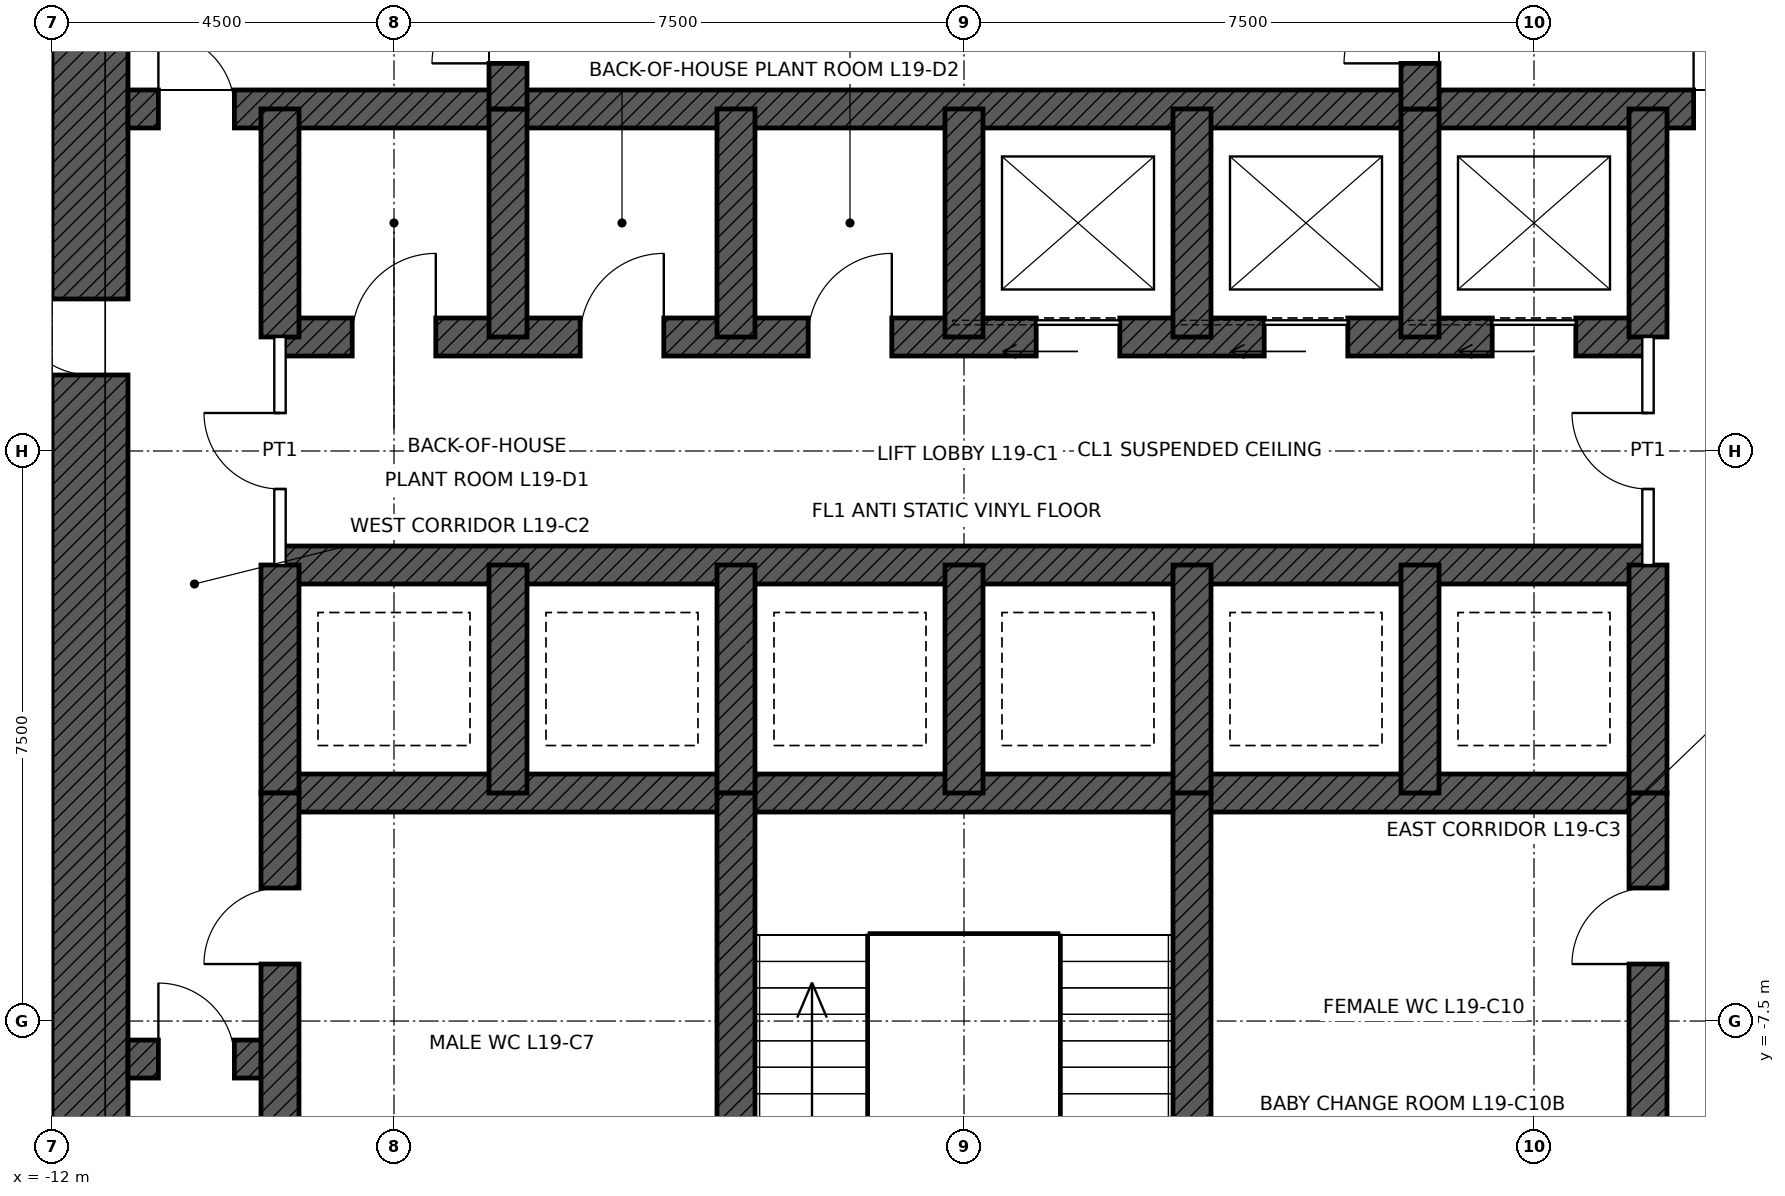
"""IFC4 building model, lengths in metres.
Left out: names, types, materials, properties, quantities, classifications, styles, units other than length and angle.
Written with IfcOpenShell. Run it as: python <this file> out.ifc"""

import sys

from ifc_helpers import new_model, si_unit, direction, frame, frame_2d, origin, place, context, subcontext, project, spatial, rectangle, extrude, element, fill, save


model = new_model("IFC4")
c1 = context("Model", 3, precision=1e-05, world=origin(), true_north=direction((0.0, 1.0)))
c2 = subcontext(c1, "Body", "Model", "MODEL_VIEW")
j1 = project(units=[si_unit("LENGTHUNIT", "METRE"), si_unit("PLANEANGLEUNIT", "RADIAN")], contexts=[c1])
p1 = place(None, origin())
s1 = spatial("IfcSite", under=j1, at=p1, CompositionType="ELEMENT")
p2 = place(p1, origin())
s2 = spatial("IfcBuilding", under=s1, at=p2, CompositionType="ELEMENT")
p3 = place(p2, frame((0.0, 0.0, 98.4)))
s3 = spatial("IfcBuildingStorey", under=s2, at=p3, CompositionType="ELEMENT", Elevation=98.4)
p4 = place(p3, frame((-11.5, -11.0, 0.0), z_axis=(0.0, 0.0, 1.0), x_axis=(0.0, 1.0, 0.0)))
e1 = element("IfcWall", 1, at=p4, inside=s3, PredefinedType="SHEAR", context=c2, shape_type="SweptSolid", body=[
    extrude(rectangle(XDim=22.0, YDim=1.0, at=frame_2d((11.0, 0.0))), origin(), (0.0, 0.0, 1.0), 6.0),
])
p5 = place(p4, frame((12.0, 0.0, 0.0)))
e2 = element("IfcOpeningElement", 2, at=p5, cuts=e1, PredefinedType="OPENING", context=c2, shape_type="SweptSolid", body=[
    extrude(rectangle(XDim=1.0, YDim=2.4, at=frame_2d((0.5, 1.2))), frame((0.0, 0.51, 0.0), z_axis=(0.0, -1.0, 0.0), x_axis=(1.0, 0.0, 0.0)), (0.0, 0.0, 1.0), 1.02),
])
p6 = place(p3, frame((-11.0, 4.5, 0.0), z_axis=(0.0, 0.0, 1.0), x_axis=(1.0, 0.0, 0.0)))
e3 = element("IfcWall", 3, at=p6, inside=s3, PredefinedType="SHEAR", context=c2, shape_type="SweptSolid", body=[
    extrude(rectangle(XDim=22.0, YDim=0.5, at=frame_2d((11.0, 0.0))), origin(), (0.0, 0.0, 1.0), 6.0),
])
p7 = place(p6, frame((0.4, 0.0, 0.0)))
e4 = element("IfcOpeningElement", 4, at=p7, cuts=e3, PredefinedType="OPENING", context=c2, shape_type="SweptSolid", body=[
    extrude(rectangle(XDim=1.0, YDim=2.1, at=frame_2d((0.5, 1.05))), frame((0.0, 0.26, 0.0), z_axis=(0.0, -1.0, 0.0), x_axis=(1.0, 0.0, 0.0)), (0.0, 0.0, 1.0), 0.52),
])
p8 = place(p6, frame((20.6, 0.0, 0.0)))
e5 = element("IfcOpeningElement", 5, at=p8, cuts=e3, PredefinedType="OPENING", context=c2, shape_type="SweptSolid", body=[
    extrude(rectangle(XDim=1.0, YDim=2.1, at=frame_2d((0.5, 1.05))), frame((0.0, 0.26, 0.0), z_axis=(0.0, -1.0, 0.0), x_axis=(1.0, 0.0, 0.0)), (0.0, 0.0, 1.0), 0.52),
])
p9 = place(p3, frame((-9.0, 1.5, 0.0), z_axis=(0.0, 0.0, 1.0), x_axis=(1.0, 0.0, 0.0)))
e6 = element("IfcWall", 6, at=p9, inside=s3, PredefinedType="SHEAR", context=c2, shape_type="SweptSolid", body=[
    extrude(rectangle(XDim=18.0, YDim=0.5, at=frame_2d((9.0, 0.0))), origin(), (0.0, 0.0, 1.0), 6.0),
])
p10 = place(p9, frame((9.95, 0.0, 0.0)))
e7 = element("IfcOpeningElement", 7, at=p10, cuts=e6, PredefinedType="OPENING", context=c2, shape_type="SweptSolid", body=[
    extrude(rectangle(XDim=1.1, YDim=2.1, at=frame_2d((0.55, 1.05))), frame((0.0, 0.26, 0.0), z_axis=(0.0, -1.0, 0.0), x_axis=(1.0, 0.0, 0.0)), (0.0, 0.0, 1.0), 0.52),
])
p11 = place(p9, frame((12.95, 0.0, 0.0)))
e8 = element("IfcOpeningElement", 8, at=p11, cuts=e6, PredefinedType="OPENING", context=c2, shape_type="SweptSolid", body=[
    extrude(rectangle(XDim=1.1, YDim=2.1, at=frame_2d((0.55, 1.05))), frame((0.0, 0.26, 0.0), z_axis=(0.0, -1.0, 0.0), x_axis=(1.0, 0.0, 0.0)), (0.0, 0.0, 1.0), 0.52),
])
p12 = place(p9, frame((15.95, 0.0, 0.0)))
e9 = element("IfcOpeningElement", 9, at=p12, cuts=e6, PredefinedType="OPENING", context=c2, shape_type="SweptSolid", body=[
    extrude(rectangle(XDim=1.1, YDim=2.1, at=frame_2d((0.55, 1.05))), frame((0.0, 0.26, 0.0), z_axis=(0.0, -1.0, 0.0), x_axis=(1.0, 0.0, 0.0)), (0.0, 0.0, 1.0), 0.52),
])
p13 = place(p9, frame((0.95, 0.0, 0.0)))
e10 = element("IfcOpeningElement", 10, at=p13, cuts=e6, PredefinedType="OPENING", context=c2, shape_type="SweptSolid", body=[
    extrude(rectangle(XDim=1.1, YDim=2.1, at=frame_2d((0.55, 1.05))), frame((0.0, 0.26, 0.0), z_axis=(0.0, -1.0, 0.0), x_axis=(1.0, 0.0, 0.0)), (0.0, 0.0, 1.0), 0.52),
])
p14 = place(p9, frame((3.95, 0.0, 0.0)))
e11 = element("IfcOpeningElement", 11, at=p14, cuts=e6, PredefinedType="OPENING", context=c2, shape_type="SweptSolid", body=[
    extrude(rectangle(XDim=1.1, YDim=2.1, at=frame_2d((0.55, 1.05))), frame((0.0, 0.26, 0.0), z_axis=(0.0, -1.0, 0.0), x_axis=(1.0, 0.0, 0.0)), (0.0, 0.0, 1.0), 0.52),
])
p15 = place(p9, frame((6.95, 0.0, 0.0)))
e12 = element("IfcOpeningElement", 12, at=p15, cuts=e6, PredefinedType="OPENING", context=c2, shape_type="SweptSolid", body=[
    extrude(rectangle(XDim=1.1, YDim=2.1, at=frame_2d((0.55, 1.05))), frame((0.0, 0.26, 0.0), z_axis=(0.0, -1.0, 0.0), x_axis=(1.0, 0.0, 0.0)), (0.0, 0.0, 1.0), 0.52),
])
for number, where, z_axis, x_axis in (
    (13, (-9.0, -1.5, 0.0), (0.0, 0.0, 1.0), (1.0, 0.0, 0.0)),
    (14, (-9.0, -4.5, 0.0), (0.0, 0.0, 1.0), (1.0, 0.0, 0.0)),
):
    element("IfcWall", number, at=place(p3, frame(where, z_axis=z_axis, x_axis=x_axis)), inside=s3, PredefinedType="SHEAR", context=c2, shape_type="SweptSolid", body=[
        extrude(rectangle(XDim=18.0, YDim=0.5, at=frame_2d((9.0, 0.0))), origin(), (0.0, 0.0, 1.0), 6.0),
    ])
p16 = place(p3, frame((-11.0, -8.0, 0.0), z_axis=(0.0, 0.0, 1.0), x_axis=(1.0, 0.0, 0.0)))
e15 = element("IfcWall", 15, at=p16, inside=s3, PredefinedType="SHEAR", context=c2, shape_type="SweptSolid", body=[
    extrude(rectangle(XDim=2.0, YDim=0.5, at=frame_2d((1.0, 0.0))), origin(), (0.0, 0.0, 1.0), 6.0),
])
p17 = place(p16, frame((0.4, 0.0, 0.0)))
e16 = element("IfcOpeningElement", 16, at=p17, cuts=e15, PredefinedType="OPENING", context=c2, shape_type="SweptSolid", body=[
    extrude(rectangle(XDim=1.0, YDim=2.1, at=frame_2d((0.5, 1.05))), frame((0.0, 0.26, 0.0), z_axis=(0.0, -1.0, 0.0), x_axis=(1.0, 0.0, 0.0)), (0.0, 0.0, 1.0), 0.52),
])
for number, where, z_axis, x_axis in (
    (17, (-9.0, 1.5, 0.0), (0.0, 0.0, 1.0), (0.0, 1.0, 0.0)),
    (18, (9.0, 1.5, 0.0), (0.0, 0.0, 1.0), (0.0, 1.0, 0.0)),
    (19, (-9.0, -4.5, 0.0), (0.0, 0.0, 1.0), (0.0, 1.0, 0.0)),
    (20, (9.0, -4.5, 0.0), (0.0, 0.0, 1.0), (0.0, 1.0, 0.0)),
    (21, (-6.0, 1.5, 0.0), (0.0, 0.0, 1.0), (0.0, 1.0, 0.0)),
    (22, (-3.0, 1.5, 0.0), (0.0, 0.0, 1.0), (0.0, 1.0, 0.0)),
    (23, (0.0, 1.5, 0.0), (0.0, 0.0, 1.0), (0.0, 1.0, 0.0)),
    (24, (3.0, 1.5, 0.0), (0.0, 0.0, 1.0), (0.0, 1.0, 0.0)),
    (25, (6.0, 1.5, 0.0), (0.0, 0.0, 1.0), (0.0, 1.0, 0.0)),
    (26, (-6.0, -4.5, 0.0), (0.0, 0.0, 1.0), (0.0, 1.0, 0.0)),
    (27, (-3.0, -4.5, 0.0), (0.0, 0.0, 1.0), (0.0, 1.0, 0.0)),
    (28, (0.0, -4.5, 0.0), (0.0, 0.0, 1.0), (0.0, 1.0, 0.0)),
    (29, (3.0, -4.5, 0.0), (0.0, 0.0, 1.0), (0.0, 1.0, 0.0)),
    (30, (6.0, -4.5, 0.0), (0.0, 0.0, 1.0), (0.0, 1.0, 0.0)),
):
    element("IfcWall", number, at=place(p3, frame(where, z_axis=z_axis, x_axis=x_axis)), inside=s3, PredefinedType="SHEAR", context=c2, shape_type="SweptSolid", body=[
        extrude(rectangle(XDim=3.0, YDim=0.5, at=frame_2d((1.5, 0.0))), origin(), (0.0, 0.0, 1.0), 6.0),
    ])
p18 = place(p3, frame((-6.0, 4.5, 0.0), z_axis=(0.0, 0.0, 1.0), x_axis=(0.0, 1.0, 0.0)))
e31 = element("IfcWall", 31, at=p18, inside=s3, PredefinedType="SHEAR", context=c2, shape_type="SweptSolid", body=[
    extrude(rectangle(XDim=6.5, YDim=0.5, at=frame_2d((3.25, 0.0))), origin(), (0.0, 0.0, 1.0), 6.0),
])
p19 = place(p18, frame((0.6, 0.0, 0.0)))
e32 = element("IfcOpeningElement", 32, at=p19, cuts=e31, PredefinedType="OPENING", context=c2, shape_type="SweptSolid", body=[
    extrude(rectangle(XDim=1.0, YDim=2.1, at=frame_2d((0.5, 1.05))), frame((0.0, 0.26, 0.0), z_axis=(0.0, -1.0, 0.0), x_axis=(1.0, 0.0, 0.0)), (0.0, 0.0, 1.0), 0.52),
])
p20 = place(p3, frame((6.0, 4.5, 0.0), z_axis=(0.0, 0.0, 1.0), x_axis=(0.0, 1.0, 0.0)))
e33 = element("IfcWall", 33, at=p20, inside=s3, PredefinedType="SHEAR", context=c2, shape_type="SweptSolid", body=[
    extrude(rectangle(XDim=6.5, YDim=0.5, at=frame_2d((3.25, 0.0))), origin(), (0.0, 0.0, 1.0), 6.0),
])
p21 = place(p20, frame((0.6, 0.0, 0.0)))
e34 = element("IfcOpeningElement", 34, at=p21, cuts=e33, PredefinedType="OPENING", context=c2, shape_type="SweptSolid", body=[
    extrude(rectangle(XDim=1.0, YDim=2.1, at=frame_2d((0.5, 1.05))), frame((0.0, 0.26, 0.0), z_axis=(0.0, -1.0, 0.0), x_axis=(1.0, 0.0, 0.0)), (0.0, 0.0, 1.0), 0.52),
])
p22 = place(p3, frame((-9.0, -11.0, 0.0), z_axis=(0.0, 0.0, 1.0), x_axis=(0.0, 1.0, 0.0)))
e35 = element("IfcWall", 35, at=p22, inside=s3, PredefinedType="SHEAR", context=c2, shape_type="SweptSolid", body=[
    extrude(rectangle(XDim=6.5, YDim=0.5, at=frame_2d((3.25, 0.0))), origin(), (0.0, 0.0, 1.0), 6.0),
])
p23 = place(p22, frame((4.25, 0.0, 0.0)))
e36 = element("IfcOpeningElement", 36, at=p23, cuts=e35, PredefinedType="OPENING", context=c2, shape_type="SweptSolid", body=[
    extrude(rectangle(XDim=1.0, YDim=2.1, at=frame_2d((0.5, 1.05))), frame((0.0, 0.26, 0.0), z_axis=(0.0, -1.0, 0.0), x_axis=(1.0, 0.0, 0.0)), (0.0, 0.0, 1.0), 0.52),
])
p24 = place(p3, frame((9.0, -11.0, 0.0), z_axis=(0.0, 0.0, 1.0), x_axis=(0.0, 1.0, 0.0)))
e37 = element("IfcWall", 37, at=p24, inside=s3, PredefinedType="SHEAR", context=c2, shape_type="SweptSolid", body=[
    extrude(rectangle(XDim=6.5, YDim=0.5, at=frame_2d((3.25, 0.0))), origin(), (0.0, 0.0, 1.0), 6.0),
])
p25 = place(p24, frame((4.25, 0.0, 0.0)))
e38 = element("IfcOpeningElement", 38, at=p25, cuts=e37, PredefinedType="OPENING", context=c2, shape_type="SweptSolid", body=[
    extrude(rectangle(XDim=1.0, YDim=2.1, at=frame_2d((0.5, 1.05))), frame((0.0, 0.26, 0.0), z_axis=(0.0, -1.0, 0.0), x_axis=(1.0, 0.0, 0.0)), (0.0, 0.0, 1.0), 0.52),
])
for number, where, z_axis, x_axis in (
    (39, (-3.0, -11.0, 0.0), (0.0, 0.0, 1.0), (0.0, 1.0, 0.0)),
    (40, (3.0, -11.0, 0.0), (0.0, 0.0, 1.0), (0.0, 1.0, 0.0)),
):
    element("IfcWall", number, at=place(p3, frame(where, z_axis=z_axis, x_axis=x_axis)), inside=s3, PredefinedType="SHEAR", context=c2, shape_type="SweptSolid", body=[
        extrude(rectangle(XDim=6.5, YDim=0.5, at=frame_2d((3.25, 0.0))), origin(), (0.0, 0.0, 1.0), 6.0),
    ])
p26 = place(p3, frame((-9.0, -1.5, 0.0), z_axis=(0.0, 0.0, 1.0), x_axis=(0.0, 1.0, 0.0)))
e41 = element("IfcWall", 41, at=p26, inside=s3, PredefinedType="PARTITIONING", context=c2, shape_type="SweptSolid", body=[
    extrude(rectangle(XDim=3.0, YDim=0.15, at=frame_2d((1.5, 0.0))), origin(), (0.0, 0.0, 1.0), 5.75),
])
p27 = place(p26, frame((1.0, 0.0, 0.0)))
e42 = element("IfcOpeningElement", 42, at=p27, cuts=e41, PredefinedType="OPENING", context=c2, shape_type="SweptSolid", body=[
    extrude(rectangle(XDim=1.0, YDim=2.4, at=frame_2d((0.5, 1.2))), frame((0.0, 0.085, 0.0), z_axis=(0.0, -1.0, 0.0), x_axis=(1.0, 0.0, 0.0)), (0.0, 0.0, 1.0), 0.17),
])
p28 = place(p3, frame((9.0, -1.5, 0.0), z_axis=(0.0, 0.0, 1.0), x_axis=(0.0, 1.0, 0.0)))
e43 = element("IfcWall", 43, at=p28, inside=s3, PredefinedType="PARTITIONING", context=c2, shape_type="SweptSolid", body=[
    extrude(rectangle(XDim=3.0, YDim=0.15, at=frame_2d((1.5, 0.0))), origin(), (0.0, 0.0, 1.0), 5.75),
])
p29 = place(p28, frame((1.0, 0.0, 0.0)))
e44 = element("IfcOpeningElement", 44, at=p29, cuts=e43, PredefinedType="OPENING", context=c2, shape_type="SweptSolid", body=[
    extrude(rectangle(XDim=1.0, YDim=2.4, at=frame_2d((0.5, 1.2))), frame((0.0, 0.085, 0.0), z_axis=(0.0, -1.0, 0.0), x_axis=(1.0, 0.0, 0.0)), (0.0, 0.0, 1.0), 0.17),
])
p30 = place(p7, origin())
e45 = element("IfcDoor", 45, at=p30, inside=s3, OperationType="SINGLE_SWING_LEFT", PredefinedType="DOOR", context=c2, shape_type="SweptSolid", body=[
    extrude(rectangle(XDim=1.0, YDim=2.1, at=frame_2d((0.5, 1.05))), frame((0.0, 0.025, 0.0), z_axis=(0.0, -1.0, 0.0), x_axis=(1.0, 0.0, 0.0)), (0.0, 0.0, 1.0), 0.05),
])
fill(e4, e45)
p31 = place(p8, origin())
e46 = element("IfcDoor", 46, at=p31, inside=s3, OperationType="SINGLE_SWING_LEFT", PredefinedType="DOOR", context=c2, shape_type="SweptSolid", body=[
    extrude(rectangle(XDim=1.0, YDim=2.1, at=frame_2d((0.5, 1.05))), frame((0.0, 0.025, 0.0), z_axis=(0.0, -1.0, 0.0), x_axis=(1.0, 0.0, 0.0)), (0.0, 0.0, 1.0), 0.05),
])
fill(e5, e46)
p32 = place(p19, origin())
e47 = element("IfcDoor", 47, at=p32, inside=s3, OperationType="SINGLE_SWING_LEFT", PredefinedType="DOOR", context=c2, shape_type="SweptSolid", body=[
    extrude(rectangle(XDim=1.0, YDim=2.1, at=frame_2d((0.5, 1.05))), frame((0.0, 0.025, 0.0), z_axis=(0.0, -1.0, 0.0), x_axis=(1.0, 0.0, 0.0)), (0.0, 0.0, 1.0), 0.05),
])
fill(e32, e47)
p33 = place(p21, origin())
e48 = element("IfcDoor", 48, at=p33, inside=s3, OperationType="SINGLE_SWING_LEFT", PredefinedType="DOOR", context=c2, shape_type="SweptSolid", body=[
    extrude(rectangle(XDim=1.0, YDim=2.1, at=frame_2d((0.5, 1.05))), frame((0.0, 0.025, 0.0), z_axis=(0.0, -1.0, 0.0), x_axis=(1.0, 0.0, 0.0)), (0.0, 0.0, 1.0), 0.05),
])
fill(e34, e48)
p34 = place(p5, origin())
e49 = element("IfcDoor", 49, at=p34, inside=s3, OperationType="SINGLE_SWING_RIGHT", PredefinedType="DOOR", context=c2, shape_type="SweptSolid", body=[
    extrude(rectangle(XDim=1.0, YDim=2.4, at=frame_2d((0.5, 1.2))), frame((0.0, 0.485, 0.0), z_axis=(0.0, -1.0, 0.0), x_axis=(1.0, 0.0, 0.0)), (0.0, 0.0, 1.0), 0.05),
])
fill(e2, e49)
p35 = place(p23, origin())
e50 = element("IfcDoor", 50, at=p35, inside=s3, OperationType="SINGLE_SWING_LEFT", PredefinedType="DOOR", context=c2, shape_type="SweptSolid", body=[
    extrude(rectangle(XDim=1.0, YDim=2.1, at=frame_2d((0.5, 1.05))), frame((0.0, 0.025, 0.0), z_axis=(0.0, -1.0, 0.0), x_axis=(1.0, 0.0, 0.0)), (0.0, 0.0, 1.0), 0.05),
])
fill(e36, e50)
p36 = place(p25, origin())
e51 = element("IfcDoor", 51, at=p36, inside=s3, OperationType="SINGLE_SWING_LEFT", PredefinedType="DOOR", context=c2, shape_type="SweptSolid", body=[
    extrude(rectangle(XDim=1.0, YDim=2.1, at=frame_2d((0.5, 1.05))), frame((0.0, 0.025, 0.0), z_axis=(0.0, -1.0, 0.0), x_axis=(1.0, 0.0, 0.0)), (0.0, 0.0, 1.0), 0.05),
])
fill(e38, e51)
p37 = place(p17, origin())
e52 = element("IfcDoor", 52, at=p37, inside=s3, OperationType="SINGLE_SWING_LEFT", PredefinedType="DOOR", context=c2, shape_type="SweptSolid", body=[
    extrude(rectangle(XDim=1.0, YDim=2.1, at=frame_2d((0.5, 1.05))), frame((0.0, 0.025, 0.0), z_axis=(0.0, -1.0, 0.0), x_axis=(1.0, 0.0, 0.0)), (0.0, 0.0, 1.0), 0.05),
])
fill(e16, e52)
p38 = place(p10, origin())
e53 = element("IfcDoor", 53, at=p38, inside=s3, OperationType="SLIDING_TO_LEFT", PredefinedType="DOOR", context=c2, shape_type="SweptSolid", body=[
    extrude(rectangle(XDim=1.1, YDim=2.1, at=frame_2d((0.55, 1.05))), frame((0.0, 0.025, 0.0), z_axis=(0.0, -1.0, 0.0), x_axis=(1.0, 0.0, 0.0)), (0.0, 0.0, 1.0), 0.05),
])
fill(e7, e53)
p39 = place(p11, origin())
e54 = element("IfcDoor", 54, at=p39, inside=s3, OperationType="SLIDING_TO_LEFT", PredefinedType="DOOR", context=c2, shape_type="SweptSolid", body=[
    extrude(rectangle(XDim=1.1, YDim=2.1, at=frame_2d((0.55, 1.05))), frame((0.0, 0.025, 0.0), z_axis=(0.0, -1.0, 0.0), x_axis=(1.0, 0.0, 0.0)), (0.0, 0.0, 1.0), 0.05),
])
fill(e8, e54)
p40 = place(p12, origin())
e55 = element("IfcDoor", 55, at=p40, inside=s3, OperationType="SLIDING_TO_LEFT", PredefinedType="DOOR", context=c2, shape_type="SweptSolid", body=[
    extrude(rectangle(XDim=1.1, YDim=2.1, at=frame_2d((0.55, 1.05))), frame((0.0, 0.025, 0.0), z_axis=(0.0, -1.0, 0.0), x_axis=(1.0, 0.0, 0.0)), (0.0, 0.0, 1.0), 0.05),
])
fill(e9, e55)
p41 = place(p27, origin())
e56 = element("IfcDoor", 56, at=p41, inside=s3, OperationType="SINGLE_SWING_RIGHT", PredefinedType="DOOR", context=c2, shape_type="SweptSolid", body=[
    extrude(rectangle(XDim=1.0, YDim=2.4, at=frame_2d((0.5, 1.2))), frame((0.0, 0.025, 0.0), z_axis=(0.0, -1.0, 0.0), x_axis=(1.0, 0.0, 0.0)), (0.0, 0.0, 1.0), 0.05),
])
fill(e42, e56)
p42 = place(p29, origin())
e57 = element("IfcDoor", 57, at=p42, inside=s3, OperationType="SINGLE_SWING_RIGHT", PredefinedType="DOOR", context=c2, shape_type="SweptSolid", body=[
    extrude(rectangle(XDim=1.0, YDim=2.4, at=frame_2d((0.5, 1.2))), frame((0.0, 0.025, 0.0), z_axis=(0.0, -1.0, 0.0), x_axis=(1.0, 0.0, 0.0)), (0.0, 0.0, 1.0), 0.05),
])
fill(e44, e57)
p43 = place(p13, origin())
e58 = element("IfcDoor", 58, at=p43, inside=s3, OperationType="SINGLE_SWING_RIGHT", PredefinedType="DOOR", context=c2, shape_type="SweptSolid", body=[
    extrude(rectangle(XDim=1.1, YDim=2.1, at=frame_2d((0.55, 1.05))), frame((0.0, 0.025, 0.0), z_axis=(0.0, -1.0, 0.0), x_axis=(1.0, 0.0, 0.0)), (0.0, 0.0, 1.0), 0.05),
])
fill(e10, e58)
p44 = place(p14, origin())
e59 = element("IfcDoor", 59, at=p44, inside=s3, OperationType="SINGLE_SWING_RIGHT", PredefinedType="DOOR", context=c2, shape_type="SweptSolid", body=[
    extrude(rectangle(XDim=1.1, YDim=2.1, at=frame_2d((0.55, 1.05))), frame((0.0, 0.025, 0.0), z_axis=(0.0, -1.0, 0.0), x_axis=(1.0, 0.0, 0.0)), (0.0, 0.0, 1.0), 0.05),
])
fill(e11, e59)
p45 = place(p15, origin())
e60 = element("IfcDoor", 60, at=p45, inside=s3, OperationType="SINGLE_SWING_RIGHT", PredefinedType="DOOR", context=c2, shape_type="SweptSolid", body=[
    extrude(rectangle(XDim=1.1, YDim=2.1, at=frame_2d((0.55, 1.05))), frame((0.0, 0.025, 0.0), z_axis=(0.0, -1.0, 0.0), x_axis=(1.0, 0.0, 0.0)), (0.0, 0.0, 1.0), 0.05),
])
fill(e12, e60)
save(model, sys.argv[1])
